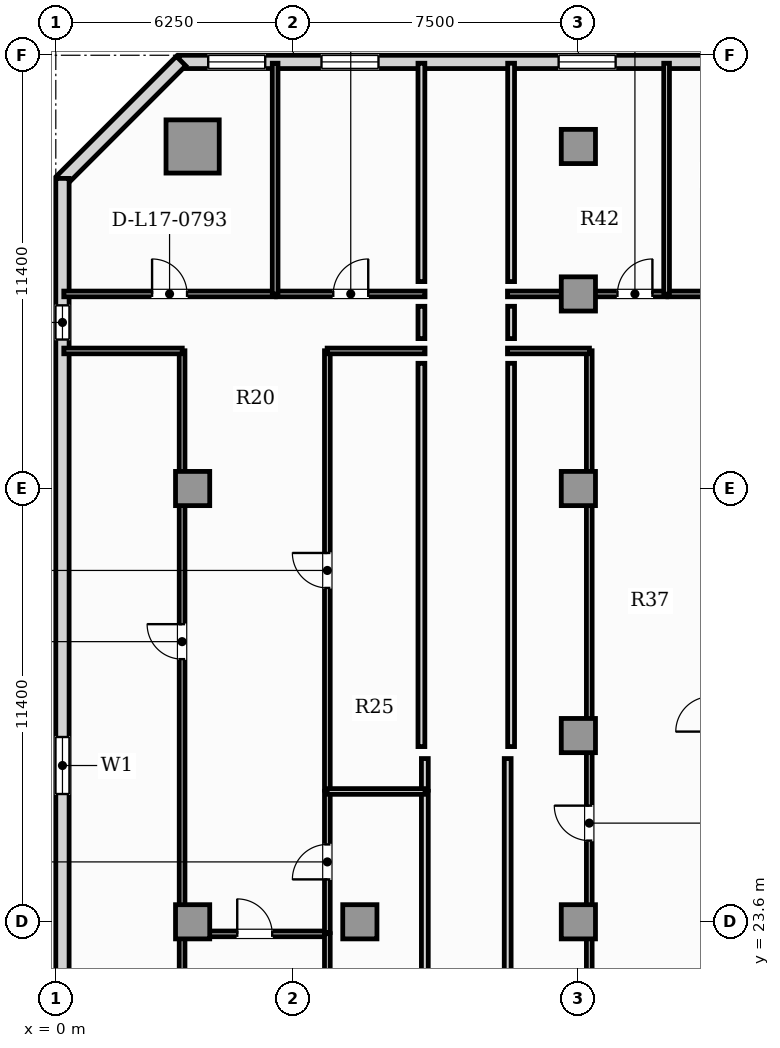
"""IFC4 building model, lengths in metres.
Left out: names, types, materials, properties, quantities, classifications, styles, units other than length and angle.
Written with IfcOpenShell. Run it as: python <this file> out.ifc"""

import sys

from ifc_helpers import new_model, si_unit, direction, frame, frame_2d, origin, origin_2d, place, context, subcontext, project, spatial, rectangle, hollow_rectangle, extrude, element, fill, save


model = new_model("IFC4")
c1 = context("Model", 3, precision=1e-05, world=origin(), true_north=direction((0.0, 1.0)))
c2 = subcontext(c1, "Body", "Model", "MODEL_VIEW")
j1 = project(units=[si_unit("LENGTHUNIT", "METRE"), si_unit("PLANEANGLEUNIT", "RADIAN")], contexts=[c1])
p1 = place(None, origin())
s1 = spatial("IfcSite", under=j1, at=p1, CompositionType="ELEMENT")
p2 = place(p1, origin())
s2 = spatial("IfcBuilding", under=s1, at=p2, CompositionType="ELEMENT")
p3 = place(p2, frame((0.0, 0.0, 72.15)))
s3 = spatial("IfcBuildingStorey", under=s2, at=p3, CompositionType="ELEMENT", Elevation=72.15)
p4 = place(p3, frame((3.6, 44.0, 0.0), z_axis=(0.0, 0.0, 1.0), x_axis=(1.0, 0.0, 0.0)))
e1 = element("IfcColumn", 1, at=p4, inside=s3, PredefinedType="USERDEFINED", context=c2, shape_type="SweptSolid", body=[
    extrude(hollow_rectangle(XDim=1.4, YDim=1.4, WallThickness=0.08, at=origin_2d()), origin(), (0.0, 0.0, 1.0), 3.85),
])
for number, where, z_axis, x_axis in (
    (2, (3.6, 23.6, 0.0), (0.0, 0.0, 1.0), (1.0, 0.0, 0.0)),
    (3, (8.0, 23.6, 0.0), (0.0, 0.0, 1.0), (1.0, 0.0, 0.0)),
    (4, (13.75, 23.6, 0.0), (0.0, 0.0, 1.0), (1.0, 0.0, 0.0)),
    (5, (13.75, 28.5, 0.0), (0.0, 0.0, 1.0), (1.0, 0.0, 0.0)),
    (6, (3.6, 35.0, 0.0), (0.0, 0.0, 1.0), (1.0, 0.0, 0.0)),
    (7, (13.75, 44.0, 0.0), (0.0, 0.0, 1.0), (1.0, 0.0, 0.0)),
    (8, (13.75, 40.12, 0.0), (0.0, 0.0, 1.0), (1.0, 0.0, 0.0)),
    (9, (13.75, 35.0, 0.0), (0.0, 0.0, 1.0), (1.0, 0.0, 0.0)),
):
    element("IfcColumn", number, at=place(p3, frame(where, z_axis=z_axis, x_axis=x_axis)), inside=s3, PredefinedType="COLUMN", context=c2, shape_type="SweptSolid", body=[
        extrude(rectangle(XDim=0.9, YDim=0.9, at=origin_2d()), origin(), (0.0, 0.0, 1.0), 3.85),
    ])
p5 = place(p3, frame((19.71, 46.225, 0.0), z_axis=(0.0, 0.0, 1.0), x_axis=(-1.0, 0.0, 0.0)))
e10 = element("IfcWall", 10, at=p5, inside=s3, PredefinedType="SOLIDWALL", context=c2, shape_type="SweptSolid", body=[
    extrude(rectangle(XDim=16.47, YDim=0.35, at=frame_2d((8.235, 0.0))), origin(), (0.0, 0.0, 1.0), 3.57),
])
p6 = place(p5, frame((14.2, 0.0, 0.9)))
e11 = element("IfcOpeningElement", 11, at=p6, cuts=e10, PredefinedType="OPENING", context=c2, shape_type="SweptSolid", body=[
    extrude(rectangle(XDim=1.5, YDim=1.95, at=frame_2d((0.75, 0.975))), frame((0.0, 0.185, 0.0), z_axis=(0.0, -1.0, 0.0), x_axis=(1.0, 0.0, 0.0)), (0.0, 0.0, 1.0), 0.37),
])
p7 = place(p5, frame((11.219, 0.0, 0.9)))
e12 = element("IfcOpeningElement", 12, at=p7, cuts=e10, PredefinedType="OPENING", context=c2, shape_type="SweptSolid", body=[
    extrude(rectangle(XDim=1.5, YDim=1.95, at=frame_2d((0.75, 0.975))), frame((0.0, 0.185, 0.0), z_axis=(0.0, -1.0, 0.0), x_axis=(1.0, 0.0, 0.0)), (0.0, 0.0, 1.0), 0.37),
])
p8 = place(p5, frame((4.979, 0.0, 0.9)))
e13 = element("IfcOpeningElement", 13, at=p8, cuts=e10, PredefinedType="OPENING", context=c2, shape_type="SweptSolid", body=[
    extrude(rectangle(XDim=1.5, YDim=1.95, at=frame_2d((0.75, 0.975))), frame((0.0, 0.185, 0.0), z_axis=(0.0, -1.0, 0.0), x_axis=(1.0, 0.0, 0.0)), (0.0, 0.0, 1.0), 0.37),
])
p9 = place(p3, frame((3.295, 46.248, 0.0), z_axis=(0.0, 0.0, 1.0), x_axis=(-0.707079321262, -0.707134240044, 0.0)))
e14 = element("IfcWall", 14, at=p9, inside=s3, PredefinedType="SOLIDWALL", context=c2, shape_type="SweptSolid", body=[
    extrude(rectangle(XDim=4.446, YDim=0.35, at=frame_2d((2.223, 0.0))), origin(), (0.0, 0.0, 1.0), 3.57),
])
p10 = place(p3, frame((0.175, 43.16, 0.0), z_axis=(0.0, 0.0, 1.0), x_axis=(0.0, -1.0, 0.0)))
e15 = element("IfcWall", 15, at=p10, inside=s3, PredefinedType="SOLIDWALL", context=c2, shape_type="SweptSolid", body=[
    extrude(rectangle(XDim=39.92, YDim=0.35, at=frame_2d((19.96, 0.0))), origin(), (0.0, 0.0, 1.0), 3.57),
])
p11 = place(p10, frame((3.34, 0.0, 0.95)))
e16 = element("IfcOpeningElement", 16, at=p11, cuts=e15, PredefinedType="OPENING", context=c2, shape_type="SweptSolid", body=[
    extrude(rectangle(XDim=0.9, YDim=1.5, at=frame_2d((0.45, 0.75))), frame((0.0, 0.185, 0.0), z_axis=(0.0, -1.0, 0.0), x_axis=(1.0, 0.0, 0.0)), (0.0, 0.0, 1.0), 0.37),
])
p12 = place(p10, frame((14.698, 0.0, 0.9)))
e17 = element("IfcOpeningElement", 17, at=p12, cuts=e15, PredefinedType="OPENING", context=c2, shape_type="SweptSolid", body=[
    extrude(rectangle(XDim=1.5, YDim=1.95, at=frame_2d((0.75, 0.975))), frame((0.0, 0.185, 0.0), z_axis=(0.0, -1.0, 0.0), x_axis=(1.0, 0.0, 0.0)), (0.0, 0.0, 1.0), 0.37),
])
p13 = place(p3, frame((9.71, 18.01, 0.0), z_axis=(0.0, 0.0, 1.0), x_axis=(0.0, 1.0, 0.0)))
e18 = element("IfcWall", 18, at=p13, inside=s3, PredefinedType="PARTITIONING", context=c2, shape_type="SweptSolid", body=[
    extrude(rectangle(XDim=9.024, YDim=0.18, at=frame_2d((4.512, 0.0))), origin(), (0.0, 0.0, 1.0), 3.57),
])
p14 = place(p3, frame((9.71, 27.064, 0.0), z_axis=(0.0, 0.0, 1.0), x_axis=(0.0, 1.0, 0.0)))
e19 = element("IfcWall", 19, at=p14, inside=s3, PredefinedType="PARTITIONING", context=c2, shape_type="SweptSolid", body=[
    extrude(rectangle(XDim=0.831, YDim=0.18, at=frame_2d((0.416, 0.0))), origin(), (0.0, 0.0, 1.0), 3.57),
])
p15 = place(p3, frame((11.89, 17.341, 0.0), z_axis=(0.0, 0.0, 1.0), x_axis=(0.0, 1.0, 0.0)))
e20 = element("IfcWall", 20, at=p15, inside=s3, PredefinedType="PARTITIONING", context=c2, shape_type="SweptSolid", body=[
    extrude(rectangle(XDim=10.554, YDim=0.18, at=frame_2d((5.277, 0.0))), origin(), (0.0, 0.0, 1.0), 3.57),
])
p16 = place(p3, frame((3.318, 23.282, 0.0), z_axis=(0.0, 0.0, 1.0), x_axis=(1.0, 0.0, 0.0)))
e21 = element("IfcWall", 21, at=p16, inside=s3, PredefinedType="PARTITIONING", context=c2, shape_type="SweptSolid", body=[
    extrude(rectangle(XDim=3.832, YDim=0.15, at=frame_2d((1.916, 0.0))), origin(), (0.0, 0.0, 1.0), 3.57),
])
p17 = place(p16, frame((1.456, 0.0, 0.0)))
e22 = element("IfcOpeningElement", 22, at=p17, cuts=e21, PredefinedType="OPENING", context=c2, shape_type="SweptSolid", body=[
    extrude(rectangle(XDim=0.92, YDim=2.1, at=frame_2d((0.46, 1.05))), frame((0.0, 0.085, 0.0), z_axis=(0.0, -1.0, 0.0), x_axis=(1.0, 0.0, 0.0)), (0.0, 0.0, 1.0), 0.17),
])
p18 = place(p3, frame((3.323, 16.839, 0.0), z_axis=(0.0, 0.0, 1.0), x_axis=(0.0, 1.0, 0.0)))
e23 = element("IfcWall", 23, at=p18, inside=s3, PredefinedType="PARTITIONING", context=c2, shape_type="SweptSolid", body=[
    extrude(rectangle(XDim=6.448, YDim=0.15, at=frame_2d((3.224, 0.0))), origin(), (0.0, 0.0, 1.0), 3.57),
])
p19 = place(p18, frame((2.764, 0.0, 0.0)))
e24 = element("IfcOpeningElement", 24, at=p19, cuts=e23, PredefinedType="OPENING", context=c2, shape_type="SweptSolid", body=[
    extrude(rectangle(XDim=0.92, YDim=2.1, at=frame_2d((0.46, 1.05))), frame((0.0, 0.085, 0.0), z_axis=(0.0, -1.0, 0.0), x_axis=(1.0, 0.0, 0.0)), (0.0, 0.0, 1.0), 0.17),
])
p20 = place(p3, frame((7.145, 18.01, 0.0), z_axis=(0.0, 0.0, 1.0), x_axis=(0.0, 1.0, 0.0)))
e25 = element("IfcWall", 25, at=p20, inside=s3, PredefinedType="PARTITIONING", context=c2, shape_type="SweptSolid", body=[
    extrude(rectangle(XDim=5.277, YDim=0.15, at=frame_2d((2.639, 0.0))), origin(), (0.0, 0.0, 1.0), 3.57),
])
p21 = place(p20, frame((2.179, 0.0, 0.0)))
e26 = element("IfcOpeningElement", 26, at=p21, cuts=e25, PredefinedType="OPENING", context=c2, shape_type="SweptSolid", body=[
    extrude(rectangle(XDim=0.92, YDim=2.1, at=frame_2d((0.46, 1.05))), frame((0.0, 0.085, 0.0), z_axis=(0.0, -1.0, 0.0), x_axis=(1.0, 0.0, 0.0)), (0.0, 0.0, 1.0), 0.17),
])
p22 = place(p3, frame((3.323, 23.317, 0.0), z_axis=(0.0, 0.0, 1.0), x_axis=(0.0, 1.0, 0.0)))
e27 = element("IfcWall", 27, at=p22, inside=s3, PredefinedType="PARTITIONING", context=c2, shape_type="SweptSolid", body=[
    extrude(rectangle(XDim=15.308, YDim=0.15, at=frame_2d((7.654, 0.0))), origin(), (0.0, 0.0, 1.0), 3.57),
])
p23 = place(p22, frame((7.194, 0.0, 0.0)))
e28 = element("IfcOpeningElement", 28, at=p23, cuts=e27, PredefinedType="OPENING", context=c2, shape_type="SweptSolid", body=[
    extrude(rectangle(XDim=0.92, YDim=2.1, at=frame_2d((0.46, 1.05))), frame((0.0, 0.085, 0.0), z_axis=(0.0, -1.0, 0.0), x_axis=(1.0, 0.0, 0.0)), (0.0, 0.0, 1.0), 0.17),
])
p24 = place(p3, frame((0.21, 38.62, 0.0), z_axis=(0.0, 0.0, 1.0), x_axis=(1.0, 0.0, 0.0)))
e29 = element("IfcWall", 29, at=p24, inside=s3, PredefinedType="PARTITIONING", context=c2, shape_type="SweptSolid", body=[
    extrude(rectangle(XDim=3.118, YDim=0.15, at=frame_2d((1.559, 0.0))), origin(), (0.0, 0.0, 1.0), 3.57),
])
p25 = place(p3, frame((7.145, 23.317, 0.0), z_axis=(0.0, 0.0, 1.0), x_axis=(0.0, 1.0, 0.0)))
e30 = element("IfcWall", 30, at=p25, inside=s3, PredefinedType="PARTITIONING", context=c2, shape_type="SweptSolid", body=[
    extrude(rectangle(XDim=3.717, YDim=0.15, at=frame_2d((1.858, 0.0))), origin(), (0.0, 0.0, 1.0), 3.57),
])
p26 = place(p25, frame((1.398, 0.0, 0.0)))
e31 = element("IfcOpeningElement", 31, at=p26, cuts=e30, PredefinedType="OPENING", context=c2, shape_type="SweptSolid", body=[
    extrude(rectangle(XDim=0.92, YDim=2.1, at=frame_2d((0.46, 1.05))), frame((0.0, 0.085, 0.0), z_axis=(0.0, -1.0, 0.0), x_axis=(1.0, 0.0, 0.0)), (0.0, 0.0, 1.0), 0.17),
])
p27 = place(p3, frame((7.145, 27.064, 0.0), z_axis=(0.0, 0.0, 1.0), x_axis=(0.0, 1.0, 0.0)))
e32 = element("IfcWall", 32, at=p27, inside=s3, PredefinedType="PARTITIONING", context=c2, shape_type="SweptSolid", body=[
    extrude(rectangle(XDim=11.561, YDim=0.15, at=frame_2d((5.781, 0.0))), origin(), (0.0, 0.0, 1.0), 3.57),
])
p28 = place(p27, frame((5.321, 0.0, 0.0)))
e33 = element("IfcOpeningElement", 33, at=p28, cuts=e32, PredefinedType="OPENING", context=c2, shape_type="SweptSolid", body=[
    extrude(rectangle(XDim=0.92, YDim=2.1, at=frame_2d((0.46, 1.05))), frame((0.0, 0.085, 0.0), z_axis=(0.0, -1.0, 0.0), x_axis=(1.0, 0.0, 0.0)), (0.0, 0.0, 1.0), 0.17),
])
p29 = place(p3, frame((7.14, 38.62, 0.0), z_axis=(0.0, 0.0, 1.0), x_axis=(1.0, 0.0, 0.0)))
e34 = element("IfcWall", 34, at=p29, inside=s3, PredefinedType="PARTITIONING", context=c2, shape_type="SweptSolid", body=[
    extrude(rectangle(XDim=2.575, YDim=0.15, at=frame_2d((1.288, 0.0))), origin(), (0.0, 0.0, 1.0), 3.57),
])
p30 = place(p3, frame((0.21, 40.12, 0.0), z_axis=(0.0, 0.0, 1.0), x_axis=(1.0, 0.0, 0.0)))
e35 = element("IfcWall", 35, at=p30, inside=s3, PredefinedType="PARTITIONING", context=c2, shape_type="SweptSolid", body=[
    extrude(rectangle(XDim=5.566, YDim=0.15, at=frame_2d((2.783, 0.0))), origin(), (0.0, 0.0, 1.0), 3.57),
])
p31 = place(p30, frame((2.323, 0.0, 0.0)))
e36 = element("IfcOpeningElement", 36, at=p31, cuts=e35, PredefinedType="OPENING", context=c2, shape_type="SweptSolid", body=[
    extrude(rectangle(XDim=0.92, YDim=2.1, at=frame_2d((0.46, 1.05))), frame((0.0, 0.085, 0.0), z_axis=(0.0, -1.0, 0.0), x_axis=(1.0, 0.0, 0.0)), (0.0, 0.0, 1.0), 0.17),
])
p32 = place(p3, frame((5.806, 40.12, 0.0), z_axis=(0.0, 0.0, 1.0), x_axis=(1.0, 0.0, 0.0)))
e37 = element("IfcWall", 37, at=p32, inside=s3, PredefinedType="PARTITIONING", context=c2, shape_type="SweptSolid", body=[
    extrude(rectangle(XDim=3.909, YDim=0.15, at=frame_2d((1.955, 0.0))), origin(), (0.0, 0.0, 1.0), 3.57),
])
p33 = place(p32, frame((1.494, 0.0, 0.0)))
e38 = element("IfcOpeningElement", 38, at=p33, cuts=e37, PredefinedType="OPENING", context=c2, shape_type="SweptSolid", body=[
    extrude(rectangle(XDim=0.92, YDim=2.1, at=frame_2d((0.46, 1.05))), frame((0.0, 0.085, 0.0), z_axis=(0.0, -1.0, 0.0), x_axis=(1.0, 0.0, 0.0)), (0.0, 0.0, 1.0), 0.17),
])
p34 = place(p3, frame((7.14, 27.029, 0.0), z_axis=(0.0, 0.0, 1.0), x_axis=(1.0, 0.0, 0.0)))
e39 = element("IfcWall", 39, at=p34, inside=s3, PredefinedType="PARTITIONING", context=c2, shape_type="SweptSolid", body=[
    extrude(rectangle(XDim=2.575, YDim=0.15, at=frame_2d((1.288, 0.0))), origin(), (0.0, 0.0, 1.0), 3.57),
])
p35 = place(p3, frame((5.771, 40.115, 0.0), z_axis=(0.0, 0.0, 1.0), x_axis=(0.0, 1.0, 0.0)))
e40 = element("IfcWall", 40, at=p35, inside=s3, PredefinedType="PARTITIONING", context=c2, shape_type="SweptSolid", body=[
    extrude(rectangle(XDim=6.075, YDim=0.15, at=frame_2d((3.038, 0.0))), origin(), (0.0, 0.0, 1.0), 3.57),
])
p36 = place(p3, frame((14.037, 19.504, 0.0), z_axis=(0.0, 0.0, 1.0), x_axis=(0.0, 1.0, 0.0)))
e41 = element("IfcWall", 41, at=p36, inside=s3, PredefinedType="PARTITIONING", context=c2, shape_type="SweptSolid", body=[
    extrude(rectangle(XDim=19.121, YDim=0.15, at=frame_2d((9.561, 0.0))), origin(), (0.0, 0.0, 1.0), 3.57),
])
p37 = place(p36, frame((6.232, 0.0, 0.0)))
e42 = element("IfcOpeningElement", 42, at=p37, cuts=e41, PredefinedType="OPENING", context=c2, shape_type="SweptSolid", body=[
    extrude(rectangle(XDim=0.92, YDim=2.1, at=frame_2d((0.46, 1.05))), frame((0.0, 0.085, 0.0), z_axis=(0.0, -1.0, 0.0), x_axis=(1.0, 0.0, 0.0)), (0.0, 0.0, 1.0), 0.17),
])
p38 = place(p3, frame((11.885, 38.62, 0.0), z_axis=(0.0, 0.0, 1.0), x_axis=(1.0, 0.0, 0.0)))
e43 = element("IfcWall", 43, at=p38, inside=s3, PredefinedType="PARTITIONING", context=c2, shape_type="SweptSolid", body=[
    extrude(rectangle(XDim=2.156, YDim=0.15, at=frame_2d((1.078, 0.0))), origin(), (0.0, 0.0, 1.0), 3.57),
])
p39 = place(p3, frame((11.885, 40.12, 0.0), z_axis=(0.0, 0.0, 1.0), x_axis=(1.0, 0.0, 0.0)))
e44 = element("IfcWall", 44, at=p39, inside=s3, PredefinedType="PARTITIONING", context=c2, shape_type="SweptSolid", body=[
    extrude(rectangle(XDim=4.191, YDim=0.15, at=frame_2d((2.096, 0.0))), origin(), (0.0, 0.0, 1.0), 3.57),
])
p40 = place(p39, frame((2.893, 0.0, 0.0)))
e45 = element("IfcOpeningElement", 45, at=p40, cuts=e44, PredefinedType="OPENING", context=c2, shape_type="SweptSolid", body=[
    extrude(rectangle(XDim=0.92, YDim=2.1, at=frame_2d((0.46, 1.05))), frame((0.0, 0.085, 0.0), z_axis=(0.0, -1.0, 0.0), x_axis=(1.0, 0.0, 0.0)), (0.0, 0.0, 1.0), 0.17),
])
p41 = place(p3, frame((16.106, 40.12, 0.0), z_axis=(0.0, 0.0, 1.0), x_axis=(1.0, 0.0, 0.0)))
e46 = element("IfcWall", 46, at=p41, inside=s3, PredefinedType="PARTITIONING", context=c2, shape_type="SweptSolid", body=[
    extrude(rectangle(XDim=3.309, YDim=0.15, at=frame_2d((1.654, 0.0))), origin(), (0.0, 0.0, 1.0), 3.57),
])
p42 = place(p41, frame((1.194, 0.0, 0.0)))
e47 = element("IfcOpeningElement", 47, at=p42, cuts=e46, PredefinedType="OPENING", context=c2, shape_type="SweptSolid", body=[
    extrude(rectangle(XDim=0.92, YDim=2.1, at=frame_2d((0.46, 1.05))), frame((0.0, 0.085, 0.0), z_axis=(0.0, -1.0, 0.0), x_axis=(1.0, 0.0, 0.0)), (0.0, 0.0, 1.0), 0.17),
])
p43 = place(p3, frame((16.071, 40.115, 0.0), z_axis=(0.0, 0.0, 1.0), x_axis=(0.0, 1.0, 0.0)))
e48 = element("IfcWall", 48, at=p43, inside=s3, PredefinedType="PARTITIONING", context=c2, shape_type="SweptSolid", body=[
    extrude(rectangle(XDim=6.075, YDim=0.15, at=frame_2d((3.038, 0.0))), origin(), (0.0, 0.0, 1.0), 3.57),
])
p44 = place(p3, frame((9.62, 39.795, 0.0), z_axis=(0.0, 0.0, 1.0), x_axis=(0.0, -1.0, 0.0)))
e49 = element("IfcWall", 49, at=p44, inside=s3, PredefinedType="PARTITIONING", context=c2, shape_type="SweptSolid", body=[
    extrude(rectangle(XDim=0.85, YDim=0.18, at=frame_2d((0.425, 0.0))), origin(), (0.0, 0.0, 1.0), 3.57),
])
p45 = place(p3, frame((9.62, 38.295, 0.0), z_axis=(0.0, 0.0, 1.0), x_axis=(0.0, -1.0, 0.0)))
e50 = element("IfcWall", 50, at=p45, inside=s3, PredefinedType="PARTITIONING", context=c2, shape_type="SweptSolid", body=[
    extrude(rectangle(XDim=10.085, YDim=0.18, at=frame_2d((5.042, 0.0))), origin(), (0.0, 0.0, 1.0), 3.57),
])
p46 = place(p3, frame((9.62, 46.19, 0.0), z_axis=(0.0, 0.0, 1.0), x_axis=(0.0, -1.0, 0.0)))
e51 = element("IfcWall", 51, at=p46, inside=s3, PredefinedType="PARTITIONING", context=c2, shape_type="SweptSolid", body=[
    extrude(rectangle(XDim=5.745, YDim=0.18, at=frame_2d((2.873, 0.0))), origin(), (0.0, 0.0, 1.0), 3.57),
])
p47 = place(p3, frame((11.98, 38.945, 0.0), z_axis=(0.0, 0.0, 1.0), x_axis=(0.0, 1.0, 0.0)))
e52 = element("IfcWall", 52, at=p47, inside=s3, PredefinedType="PARTITIONING", context=c2, shape_type="SweptSolid", body=[
    extrude(rectangle(XDim=0.85, YDim=0.18, at=frame_2d((0.425, 0.0))), origin(), (0.0, 0.0, 1.0), 3.57),
])
p48 = place(p3, frame((11.98, 28.21, 0.0), z_axis=(0.0, 0.0, 1.0), x_axis=(0.0, 1.0, 0.0)))
e53 = element("IfcWall", 53, at=p48, inside=s3, PredefinedType="PARTITIONING", context=c2, shape_type="SweptSolid", body=[
    extrude(rectangle(XDim=10.085, YDim=0.18, at=frame_2d((5.042, 0.0))), origin(), (0.0, 0.0, 1.0), 3.57),
])
p49 = place(p3, frame((11.98, 40.445, 0.0), z_axis=(0.0, 0.0, 1.0), x_axis=(0.0, 1.0, 0.0)))
e54 = element("IfcWall", 54, at=p49, inside=s3, PredefinedType="PARTITIONING", context=c2, shape_type="SweptSolid", body=[
    extrude(rectangle(XDim=5.745, YDim=0.18, at=frame_2d((2.873, 0.0))), origin(), (0.0, 0.0, 1.0), 3.57),
])
p50 = place(p11, origin())
e55 = element("IfcWindow", 55, at=p50, inside=s3, PartitioningType="SINGLE_PANEL", PredefinedType="WINDOW", context=c2, shape_type="SweptSolid", body=[
    extrude(rectangle(XDim=0.9, YDim=1.5, at=frame_2d((0.45, 0.75))), frame((0.0, 0.03, 0.0), z_axis=(0.0, -1.0, 0.0), x_axis=(1.0, 0.0, 0.0)), (0.0, 0.0, 1.0), 0.06),
])
fill(e16, e55)
p51 = place(p12, origin())
e56 = element("IfcWindow", 56, at=p51, inside=s3, PartitioningType="SINGLE_PANEL", PredefinedType="WINDOW", context=c2, shape_type="SweptSolid", body=[
    extrude(rectangle(XDim=1.5, YDim=1.95, at=frame_2d((0.75, 0.975))), frame((0.0, 0.03, 0.0), z_axis=(0.0, -1.0, 0.0), x_axis=(1.0, 0.0, 0.0)), (0.0, 0.0, 1.0), 0.06),
])
fill(e17, e56)
p52 = place(p6, origin())
e57 = element("IfcWindow", 57, at=p52, inside=s3, PartitioningType="SINGLE_PANEL", PredefinedType="WINDOW", context=c2, shape_type="SweptSolid", body=[
    extrude(rectangle(XDim=1.5, YDim=1.95, at=frame_2d((0.75, 0.975))), frame((0.0, 0.03, 0.0), z_axis=(0.0, -1.0, 0.0), x_axis=(1.0, 0.0, 0.0)), (0.0, 0.0, 1.0), 0.06),
])
fill(e11, e57)
p53 = place(p7, origin())
e58 = element("IfcWindow", 58, at=p53, inside=s3, PartitioningType="SINGLE_PANEL", PredefinedType="WINDOW", context=c2, shape_type="SweptSolid", body=[
    extrude(rectangle(XDim=1.5, YDim=1.95, at=frame_2d((0.75, 0.975))), frame((0.0, 0.03, 0.0), z_axis=(0.0, -1.0, 0.0), x_axis=(1.0, 0.0, 0.0)), (0.0, 0.0, 1.0), 0.06),
])
fill(e12, e58)
p54 = place(p8, origin())
e59 = element("IfcWindow", 59, at=p54, inside=s3, PartitioningType="SINGLE_PANEL", PredefinedType="WINDOW", context=c2, shape_type="SweptSolid", body=[
    extrude(rectangle(XDim=1.5, YDim=1.95, at=frame_2d((0.75, 0.975))), frame((0.0, 0.03, 0.0), z_axis=(0.0, -1.0, 0.0), x_axis=(1.0, 0.0, 0.0)), (0.0, 0.0, 1.0), 0.06),
])
fill(e13, e59)
p55 = place(p17, origin())
e60 = element("IfcDoor", 60, at=p55, inside=s3, OperationType="SINGLE_SWING_LEFT", PredefinedType="DOOR", context=c2, shape_type="SweptSolid", body=[
    extrude(rectangle(XDim=0.92, YDim=2.1, at=frame_2d((0.46, 1.05))), frame((0.0, 0.025, 0.0), z_axis=(0.0, -1.0, 0.0), x_axis=(1.0, 0.0, 0.0)), (0.0, 0.0, 1.0), 0.05),
])
fill(e22, e60)
p56 = place(p23, origin())
e61 = element("IfcDoor", 61, at=p56, inside=s3, OperationType="SINGLE_SWING_RIGHT", PredefinedType="DOOR", context=c2, shape_type="SweptSolid", body=[
    extrude(rectangle(XDim=0.92, YDim=2.1, at=frame_2d((0.46, 1.05))), frame((0.0, 0.025, 0.0), z_axis=(0.0, -1.0, 0.0), x_axis=(1.0, 0.0, 0.0)), (0.0, 0.0, 1.0), 0.05),
])
fill(e28, e61)
p57 = place(p26, origin())
e62 = element("IfcDoor", 62, at=p57, inside=s3, OperationType="SINGLE_SWING_LEFT", PredefinedType="DOOR", context=c2, shape_type="SweptSolid", body=[
    extrude(rectangle(XDim=0.92, YDim=2.1, at=frame_2d((0.46, 1.05))), frame((0.0, 0.025, 0.0), z_axis=(0.0, -1.0, 0.0), x_axis=(1.0, 0.0, 0.0)), (0.0, 0.0, 1.0), 0.05),
])
fill(e31, e62)
p58 = place(p28, origin())
e63 = element("IfcDoor", 63, at=p58, inside=s3, OperationType="SINGLE_SWING_RIGHT", PredefinedType="DOOR", context=c2, shape_type="SweptSolid", body=[
    extrude(rectangle(XDim=0.92, YDim=2.1, at=frame_2d((0.46, 1.05))), frame((0.0, 0.025, 0.0), z_axis=(0.0, -1.0, 0.0), x_axis=(1.0, 0.0, 0.0)), (0.0, 0.0, 1.0), 0.05),
])
fill(e33, e63)
p59 = place(p31, origin())
e64 = element("IfcDoor", 64, at=p59, inside=s3, OperationType="SINGLE_SWING_LEFT", PredefinedType="DOOR", context=c2, shape_type="SweptSolid", body=[
    extrude(rectangle(XDim=0.92, YDim=2.1, at=frame_2d((0.46, 1.05))), frame((0.0, 0.025, 0.0), z_axis=(0.0, -1.0, 0.0), x_axis=(1.0, 0.0, 0.0)), (0.0, 0.0, 1.0), 0.05),
])
fill(e36, e64)
p60 = place(p33, origin())
e65 = element("IfcDoor", 65, at=p60, inside=s3, OperationType="SINGLE_SWING_RIGHT", PredefinedType="DOOR", context=c2, shape_type="SweptSolid", body=[
    extrude(rectangle(XDim=0.92, YDim=2.1, at=frame_2d((0.46, 1.05))), frame((0.0, 0.025, 0.0), z_axis=(0.0, -1.0, 0.0), x_axis=(1.0, 0.0, 0.0)), (0.0, 0.0, 1.0), 0.05),
])
fill(e38, e65)
p61 = place(p37, origin())
e66 = element("IfcDoor", 66, at=p61, inside=s3, OperationType="SINGLE_SWING_RIGHT", PredefinedType="DOOR", context=c2, shape_type="SweptSolid", body=[
    extrude(rectangle(XDim=0.92, YDim=2.1, at=frame_2d((0.46, 1.05))), frame((0.0, 0.025, 0.0), z_axis=(0.0, -1.0, 0.0), x_axis=(1.0, 0.0, 0.0)), (0.0, 0.0, 1.0), 0.05),
])
fill(e42, e66)
p62 = place(p40, origin())
e67 = element("IfcDoor", 67, at=p62, inside=s3, OperationType="SINGLE_SWING_RIGHT", PredefinedType="DOOR", context=c2, shape_type="SweptSolid", body=[
    extrude(rectangle(XDim=0.92, YDim=2.1, at=frame_2d((0.46, 1.05))), frame((0.0, 0.025, 0.0), z_axis=(0.0, -1.0, 0.0), x_axis=(1.0, 0.0, 0.0)), (0.0, 0.0, 1.0), 0.05),
])
fill(e45, e67)
save(model, sys.argv[1])
